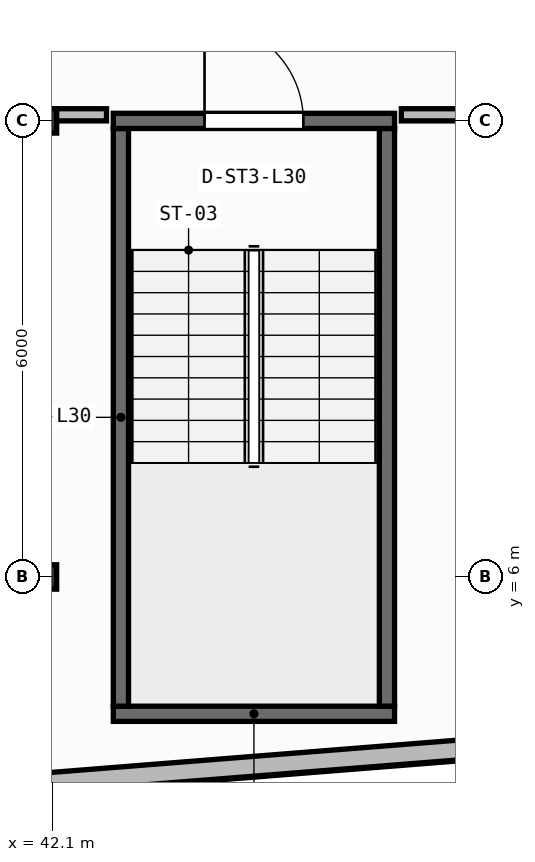
"""IFC4 building model, lengths in metres.
Left out: names, types, materials, properties, quantities, classifications, styles, units other than length and angle.
Written with IfcOpenShell. Run it as: python <this file> out.ifc"""

import sys

from ifc_helpers import new_model, si_unit, direction, frame, frame_2d, origin, origin_2d, place, context, subcontext, project, spatial, rectangle, i_section, extrude, element, fill, save


model = new_model("IFC4")
c1 = context("Model", 3, precision=1e-05, world=origin(), true_north=direction((0.0, 1.0)))
c2 = subcontext(c1, "Body", "Model", "MODEL_VIEW")
j1 = project(units=[si_unit("LENGTHUNIT", "METRE"), si_unit("PLANEANGLEUNIT", "RADIAN")], contexts=[c1])
p1 = place(None, origin())
s1 = spatial("IfcSite", under=j1, at=p1, CompositionType="ELEMENT")
p2 = place(p1, origin())
s2 = spatial("IfcBuilding", under=s1, at=p2, CompositionType="ELEMENT")
p3 = place(p2, frame((0.0, 0.0, 123.1)))
s3 = spatial("IfcBuildingStorey", under=s2, at=p3, CompositionType="ELEMENT", Elevation=123.1)
for number, where, z_axis, x_axis in (
    (1, (42.0, 6.0, 0.0), (0.0, 0.0, 1.0), (1.0, 0.0, 0.0)),
    (2, (42.0, 12.0, 0.0), (0.0, 0.0, 1.0), (1.0, 0.0, 0.0)),
):
    element("IfcColumn", number, at=place(p3, frame(where, z_axis=z_axis, x_axis=x_axis)), inside=s3, PredefinedType="COLUMN", context=c2, shape_type="SweptSolid", body=[
        extrude(i_section(OverallWidth=0.309, OverallDepth=0.321, WebThickness=0.014, FlangeThickness=0.022, FilletRadius=0.017, at=origin_2d()), origin(), (0.0, 0.0, 1.0), 3.95),
    ])
p4 = place(p3, frame((2.76, 0.173, 0.0), z_axis=(0.0, 0.0, 1.0), x_axis=(0.996857931723, 0.079210251617, 0.0)))
e3 = element("IfcWall", 3, at=p4, inside=s3, PredefinedType="STANDARD", context=c2, shape_type="SweptSolid", body=[
    extrude(rectangle(XDim=51.442, YDim=0.26, at=frame_2d((25.721, 0.0))), origin(), (0.0, 0.0, 1.0), 3.71),
])
p5 = place(p4, frame((24.521, 0.0, 0.9)))
e4 = element("IfcOpeningElement", 4, at=p5, cuts=e3, PredefinedType="OPENING", context=c2, shape_type="SweptSolid", body=[
    extrude(rectangle(XDim=2.4, YDim=1.65, at=frame_2d((1.2, 0.825))), frame((0.0, 0.14, 0.0), z_axis=(0.0, -1.0, 0.0), x_axis=(1.0, 0.0, 0.0)), (0.0, 0.0, 1.0), 0.28),
])
p6 = place(p3, frame((42.9, 4.2, 0.0), z_axis=(0.0, 0.0, 1.0), x_axis=(1.0, 0.0, 0.0)))
e5 = element("IfcWall", 5, at=p6, inside=s3, PredefinedType="SHEAR", context=c2, shape_type="SweptSolid", body=[
    extrude(rectangle(XDim=3.7, YDim=0.2, at=frame_2d((1.85, 0.0))), origin(), (0.0, 0.0, 1.0), 3.71),
])
for number, where, z_axis, x_axis in (
    (6, (43.0, 4.3, 0.0), (0.0, 0.0, 1.0), (0.0, 1.0, 0.0)),
    (7, (46.5, 4.3, 0.0), (0.0, 0.0, 1.0), (0.0, 1.0, 0.0)),
):
    element("IfcWall", number, at=place(p3, frame(where, z_axis=z_axis, x_axis=x_axis)), inside=s3, PredefinedType="SHEAR", context=c2, shape_type="SweptSolid", body=[
        extrude(rectangle(XDim=7.6, YDim=0.2, at=frame_2d((3.8, 0.0))), origin(), (0.0, 0.0, 1.0), 3.71),
    ])
p7 = place(p3, frame((42.9, 12.0, 0.0), z_axis=(0.0, 0.0, 1.0), x_axis=(1.0, 0.0, 0.0)))
e8 = element("IfcWall", 8, at=p7, inside=s3, PredefinedType="SHEAR", context=c2, shape_type="SweptSolid", body=[
    extrude(rectangle(XDim=3.7, YDim=0.2, at=frame_2d((1.85, 0.0))), origin(), (0.0, 0.0, 1.0), 3.71),
])
p8 = place(p7, frame((1.2, 0.0, 0.0)))
e9 = element("IfcOpeningElement", 9, at=p8, cuts=e8, PredefinedType="OPENING", context=c2, shape_type="SweptSolid", body=[
    extrude(rectangle(XDim=1.3, YDim=2.15, at=frame_2d((0.65, 1.075))), frame((0.0, 0.11, 0.0), z_axis=(0.0, -1.0, 0.0), x_axis=(1.0, 0.0, 0.0)), (0.0, 0.0, 1.0), 0.22),
])
p9 = place(p3, frame((40.03, 12.08, 0.0), z_axis=(0.0, 0.0, 1.0), x_axis=(1.0, 0.0, 0.0)))
e10 = element("IfcWall", 10, at=p9, inside=s3, PredefinedType="PARTITIONING", context=c2, shape_type="SweptSolid", body=[
    extrude(rectangle(XDim=2.781, YDim=0.16, at=frame_2d((1.39, 0.0))), origin(), (0.0, 0.0, 1.0), 3.083),
])
p10 = place(p3, frame((46.689, 12.08, 0.0), z_axis=(0.0, 0.0, 1.0), x_axis=(1.0, 0.0, 0.0)))
e11 = element("IfcWall", 11, at=p10, inside=s3, PredefinedType="PARTITIONING", context=c2, shape_type="SweptSolid", body=[
    extrude(rectangle(XDim=3.011, YDim=0.16, at=frame_2d((1.505, 0.0))), origin(), (0.0, 0.0, 1.0), 3.083),
])
p11 = place(p8, origin())
e12 = element("IfcDoor", 12, at=p11, inside=s3, OperationType="SINGLE_SWING_LEFT", PredefinedType="DOOR", context=c2, shape_type="SweptSolid", body=[
    extrude(rectangle(XDim=1.3, YDim=2.15, at=frame_2d((0.65, 1.075))), frame((0.0, 0.025, 0.0), z_axis=(0.0, -1.0, 0.0), x_axis=(1.0, 0.0, 0.0)), (0.0, 0.0, 1.0), 0.05),
])
fill(e9, e12)
save(model, sys.argv[1])
